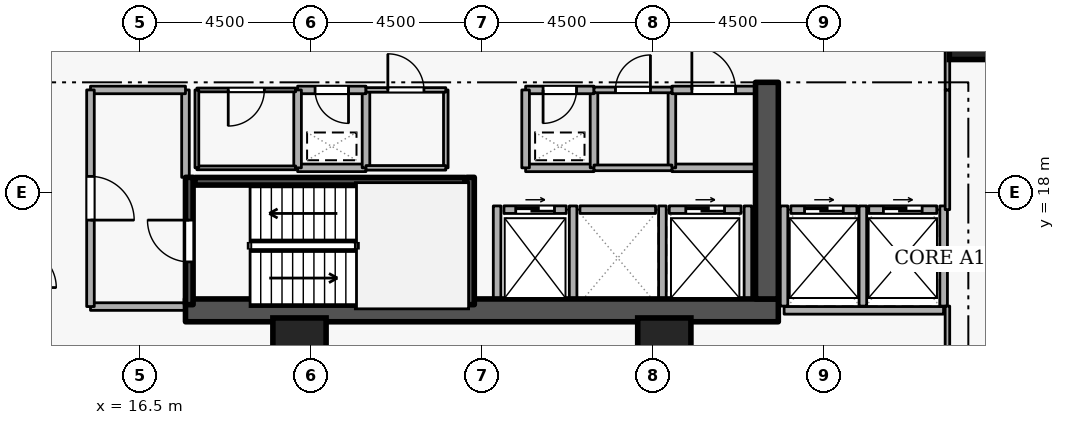
"""IFC4 building model, lengths in metres.
Left out: names, types, materials, properties, quantities, classifications, styles, units other than length and angle.
Written with IfcOpenShell. Run it as: python <this file> out.ifc"""

import sys

from ifc_helpers import new_model, si_unit, direction, frame, frame_2d, origin, origin_2d, place, context, subcontext, project, spatial, rectangle, extrude, element, fill, save


model = new_model("IFC4")
c1 = context("Model", 3, precision=1e-05, world=origin(), true_north=direction((0.0, 1.0)))
c2 = subcontext(c1, "Body", "Model", "MODEL_VIEW")
j1 = project(units=[si_unit("LENGTHUNIT", "METRE"), si_unit("PLANEANGLEUNIT", "RADIAN")], contexts=[c1])
p1 = place(None, origin())
s1 = spatial("IfcSite", under=j1, at=p1, CompositionType="ELEMENT")
p2 = place(p1, origin())
s2 = spatial("IfcBuilding", under=s1, at=p2, CompositionType="ELEMENT")
p3 = place(p2, frame((0.0, 0.0, 57.3)))
s3 = spatial("IfcBuildingStorey", under=s2, at=p3, CompositionType="ELEMENT", Elevation=57.3)
p4 = place(p3, frame((17.7, 14.9, 0.0), z_axis=(0.0, 0.0, 1.0), x_axis=(1.0, 0.0, 0.0)))
e1 = element("IfcWall", 1, at=p4, inside=s3, PredefinedType="SHEAR", context=c2, shape_type="SweptSolid", body=[
    extrude(rectangle(XDim=15.6, YDim=0.6, at=frame_2d((7.8, 0.0))), origin(), (0.0, 0.0, 1.0), 3.6),
])
p5 = place(p3, frame((33.0, 15.2, 0.0), z_axis=(0.0, 0.0, 1.0), x_axis=(0.0, 1.0, 0.0)))
e2 = element("IfcWall", 2, at=p5, inside=s3, PredefinedType="SHEAR", context=c2, shape_type="SweptSolid", body=[
    extrude(rectangle(XDim=5.7, YDim=0.6, at=frame_2d((2.85, 0.0))), origin(), (0.0, 0.0, 1.0), 3.6),
])
for number, where, z_axis, x_axis in (
    (3, (38.5, 22.2, 0.0), (0.0, 0.0, 1.0), (1.0, 0.0, 0.0)),
    (4, (20.7, 14.0, 0.0), (0.0, 0.0, 1.0), (1.0, 0.0, 0.0)),
    (5, (30.3, 14.0, 0.0), (0.0, 0.0, 1.0), (1.0, 0.0, 0.0)),
):
    element("IfcColumn", number, at=place(p3, frame(where, z_axis=z_axis, x_axis=x_axis)), inside=s3, PredefinedType="COLUMN", context=c2, shape_type="SweptSolid", body=[
        extrude(rectangle(XDim=1.4, YDim=1.4, at=origin_2d()), origin(), (0.0, 0.0, 1.0), 3.6),
    ])
p6 = place(p3, frame((26.08, 17.55, 0.0), z_axis=(0.0, 0.0, 1.0), x_axis=(1.0, 0.0, 0.0)))
e6 = element("IfcWall", 6, at=p6, inside=s3, PredefinedType="STANDARD", context=c2, shape_type="SweptSolid", body=[
    extrude(rectangle(XDim=1.64, YDim=0.2, at=frame_2d((0.82, 0.0))), origin(), (0.0, 0.0, 1.0), 3.34),
])
p7 = place(p6, frame((0.31, 0.0, 0.0)))
e7 = element("IfcOpeningElement", 7, at=p7, cuts=e6, PredefinedType="OPENING", context=c2, shape_type="SweptSolid", body=[
    extrude(rectangle(XDim=1.02, YDim=2.06, at=frame_2d((0.51, 1.03))), frame((0.0, 0.11, 0.0), z_axis=(0.0, -1.0, 0.0), x_axis=(1.0, 0.0, 0.0)), (0.0, 0.0, 1.0), 0.22),
])
p8 = place(p3, frame((28.08, 17.55, 0.0), z_axis=(0.0, 0.0, 1.0), x_axis=(1.0, 0.0, 0.0)))
e8 = element("IfcWall", 8, at=p8, inside=s3, PredefinedType="STANDARD", context=c2, shape_type="SweptSolid", body=[
    extrude(rectangle(XDim=1.99, YDim=0.2, at=frame_2d((0.995, 0.0))), origin(), (0.0, 0.0, 1.0), 3.34),
])
p9 = place(p3, frame((30.43, 17.55, 0.0), z_axis=(0.0, 0.0, 1.0), x_axis=(1.0, 0.0, 0.0)))
e9 = element("IfcWall", 9, at=p9, inside=s3, PredefinedType="STANDARD", context=c2, shape_type="SweptSolid", body=[
    extrude(rectangle(XDim=1.89, YDim=0.2, at=frame_2d((0.945, 0.0))), origin(), (0.0, 0.0, 1.0), 3.34),
])
p10 = place(p9, frame((0.435, 0.0, 0.0)))
e10 = element("IfcOpeningElement", 10, at=p10, cuts=e9, PredefinedType="OPENING", context=c2, shape_type="SweptSolid", body=[
    extrude(rectangle(XDim=1.02, YDim=2.06, at=frame_2d((0.51, 1.03))), frame((0.0, 0.11, 0.0), z_axis=(0.0, -1.0, 0.0), x_axis=(1.0, 0.0, 0.0)), (0.0, 0.0, 1.0), 0.22),
])
p11 = place(p3, frame((33.63, 17.55, 0.0), z_axis=(0.0, 0.0, 1.0), x_axis=(1.0, 0.0, 0.0)))
e11 = element("IfcWall", 11, at=p11, inside=s3, PredefinedType="STANDARD", context=c2, shape_type="SweptSolid", body=[
    extrude(rectangle(XDim=1.74, YDim=0.2, at=frame_2d((0.87, 0.0))), origin(), (0.0, 0.0, 1.0), 3.34),
])
p12 = place(p11, frame((0.36, 0.0, 0.0)))
e12 = element("IfcOpeningElement", 12, at=p12, cuts=e11, PredefinedType="OPENING", context=c2, shape_type="SweptSolid", body=[
    extrude(rectangle(XDim=1.02, YDim=2.06, at=frame_2d((0.51, 1.03))), frame((0.0, 0.11, 0.0), z_axis=(0.0, -1.0, 0.0), x_axis=(1.0, 0.0, 0.0)), (0.0, 0.0, 1.0), 0.22),
])
p13 = place(p3, frame((35.68, 17.55, 0.0), z_axis=(0.0, 0.0, 1.0), x_axis=(1.0, 0.0, 0.0)))
e13 = element("IfcWall", 13, at=p13, inside=s3, PredefinedType="STANDARD", context=c2, shape_type="SweptSolid", body=[
    extrude(rectangle(XDim=1.79, YDim=0.2, at=frame_2d((0.895, 0.0))), origin(), (0.0, 0.0, 1.0), 3.34),
])
p14 = place(p13, frame((0.385, 0.0, 0.0)))
e14 = element("IfcOpeningElement", 14, at=p14, cuts=e13, PredefinedType="OPENING", context=c2, shape_type="SweptSolid", body=[
    extrude(rectangle(XDim=1.02, YDim=2.06, at=frame_2d((0.51, 1.03))), frame((0.0, 0.11, 0.0), z_axis=(0.0, -1.0, 0.0), x_axis=(1.0, 0.0, 0.0)), (0.0, 0.0, 1.0), 0.22),
])
for number, where, z_axis, x_axis in (
    (15, (27.9, 15.212, 0.0), (0.0, 0.0, 1.0), (0.0, 1.0, 0.0)),
    (16, (25.9, 15.212, 0.0), (0.0, 0.0, 1.0), (0.0, 1.0, 0.0)),
    (17, (30.25, 15.212, 0.0), (0.0, 0.0, 1.0), (0.0, 1.0, 0.0)),
    (18, (32.5, 15.212, 0.0), (0.0, 0.0, 1.0), (0.0, 1.0, 0.0)),
):
    element("IfcWall", number, at=place(p3, frame(where, z_axis=z_axis, x_axis=x_axis)), inside=s3, PredefinedType="STANDARD", context=c2, shape_type="SweptSolid", body=[
        extrude(rectangle(XDim=2.436, YDim=0.2, at=frame_2d((1.218, 0.0))), origin(), (0.0, 0.0, 1.0), 3.34),
    ])
p15 = place(p3, frame((33.452, 14.9, 0.0), z_axis=(0.0, 0.0, 1.0), x_axis=(1.0, 0.0, 0.0)))
e19 = element("IfcWall", 19, at=p15, inside=s3, PredefinedType="STANDARD", context=c2, shape_type="SweptSolid", body=[
    extrude(rectangle(XDim=4.196, YDim=0.2, at=frame_2d((2.098, 0.0))), origin(), (0.0, 0.0, 1.0), 3.34),
])
for number, where, z_axis, x_axis in (
    (20, (35.525, 15.012, 0.0), (0.0, 0.0, 1.0), (0.0, 1.0, 0.0)),
    (21, (33.45, 15.012, 0.0), (0.0, 0.0, 1.0), (0.0, 1.0, 0.0)),
    (22, (37.65, 15.012, 0.0), (0.0, 0.0, 1.0), (0.0, 1.0, 0.0)),
):
    element("IfcWall", number, at=place(p3, frame(where, z_axis=z_axis, x_axis=x_axis)), inside=s3, PredefinedType="STANDARD", context=c2, shape_type="SweptSolid", body=[
        extrude(rectangle(XDim=2.636, YDim=0.2, at=frame_2d((1.318, 0.0))), origin(), (0.0, 0.0, 1.0), 3.34),
    ])
p16 = place(p3, frame((17.8, 15.05, 0.0), z_axis=(0.0, 0.0, 1.0), x_axis=(0.0, 1.0, 0.0)))
e23 = element("IfcWall", 23, at=p16, inside=s3, PredefinedType="SHEAR", context=c2, shape_type="SweptSolid", body=[
    extrude(rectangle(XDim=3.35, YDim=0.2, at=frame_2d((1.675, 0.0))), origin(), (0.0, 0.0, 1.0), 3.6),
])
p17 = place(p16, frame((1.125, 0.0, 0.0)))
e24 = element("IfcOpeningElement", 24, at=p17, cuts=e23, PredefinedType="OPENING", context=c2, shape_type="SweptSolid", body=[
    extrude(rectangle(XDim=1.1, YDim=2.1, at=frame_2d((0.55, 1.05))), frame((0.0, 0.11, 0.0), z_axis=(0.0, -1.0, 0.0), x_axis=(1.0, 0.0, 0.0)), (0.0, 0.0, 1.0), 0.22),
])
p18 = place(p3, frame((25.2, 18.4, 0.0), z_axis=(0.0, 0.0, 1.0), x_axis=(0.0, -1.0, 0.0)))
e25 = element("IfcWall", 25, at=p18, inside=s3, PredefinedType="SHEAR", context=c2, shape_type="SweptSolid", body=[
    extrude(rectangle(XDim=3.35, YDim=0.2, at=frame_2d((1.675, 0.0))), origin(), (0.0, 0.0, 1.0), 3.6),
])
p19 = place(p3, frame((25.05, 18.297, 0.0), z_axis=(0.0, 0.0, 1.0), x_axis=(-1.0, 0.0, 0.0)))
e26 = element("IfcWall", 26, at=p19, inside=s3, PredefinedType="SHEAR", context=c2, shape_type="SweptSolid", body=[
    extrude(rectangle(XDim=7.1, YDim=0.2, at=frame_2d((3.55, 0.0))), origin(), (0.0, 0.0, 1.0), 3.6),
])
p20 = place(p3, frame((15.2, 15.0, 0.0), z_axis=(0.0, 0.0, 1.0), x_axis=(1.0, 0.0, 0.0)))
e27 = element("IfcWall", 27, at=p20, inside=s3, PredefinedType="STANDARD", context=c2, shape_type="SweptSolid", body=[
    extrude(rectangle(XDim=2.5, YDim=0.2, at=frame_2d((1.25, 0.0))), origin(), (0.0, 0.0, 1.0), 3.34),
])
p21 = place(p3, frame((17.7, 18.4, 0.0), z_axis=(0.0, 0.0, 1.0), x_axis=(0.0, 1.0, 0.0)))
e28 = element("IfcWall", 28, at=p21, inside=s3, PredefinedType="STANDARD", context=c2, shape_type="SweptSolid", body=[
    extrude(rectangle(XDim=2.3, YDim=0.2, at=frame_2d((1.15, 0.0))), origin(), (0.0, 0.0, 1.0), 2.545),
])
p22 = place(p3, frame((17.7, 20.7, 0.0), z_axis=(0.0, 0.0, 1.0), x_axis=(-1.0, 0.0, 0.0)))
e29 = element("IfcWall", 29, at=p22, inside=s3, PredefinedType="STANDARD", context=c2, shape_type="SweptSolid", body=[
    extrude(rectangle(XDim=2.5, YDim=0.2, at=frame_2d((1.25, 0.0))), origin(), (0.0, 0.0, 1.0), 3.34),
])
p23 = place(p3, frame((15.2, 20.7, 0.0), z_axis=(0.0, 0.0, 1.0), x_axis=(0.0, -1.0, 0.0)))
e30 = element("IfcWall", 30, at=p23, inside=s3, PredefinedType="STANDARD", context=c2, shape_type="SweptSolid", body=[
    extrude(rectangle(XDim=5.7, YDim=0.2, at=frame_2d((2.85, 0.0))), origin(), (0.0, 0.0, 1.0), 3.34),
])
p24 = place(p23, frame((2.275, 0.0, 0.0)))
e31 = element("IfcOpeningElement", 31, at=p24, cuts=e30, PredefinedType="OPENING", context=c2, shape_type="SweptSolid", body=[
    extrude(rectangle(XDim=1.15, YDim=2.1, at=frame_2d((0.575, 1.05))), frame((0.0, 0.11, 0.0), z_axis=(0.0, -1.0, 0.0), x_axis=(1.0, 0.0, 0.0)), (0.0, 0.0, 1.0), 0.22),
])
p25 = place(p3, frame((26.65, 18.65, 0.0), z_axis=(0.0, 0.0, 1.0), x_axis=(1.0, 0.0, 0.0)))
e32 = element("IfcWall", 32, at=p25, inside=s3, PredefinedType="STANDARD", context=c2, shape_type="SweptSolid", body=[
    extrude(rectangle(XDim=1.8, YDim=0.2, at=frame_2d((0.9, 0.0))), origin(), (0.0, 0.0, 1.0), 3.34),
])
p26 = place(p3, frame((28.45, 18.65, 0.0), z_axis=(0.0, 0.0, 1.0), x_axis=(0.0, 1.0, 0.0)))
e33 = element("IfcWall", 33, at=p26, inside=s3, PredefinedType="STANDARD", context=c2, shape_type="SweptSolid", body=[
    extrude(rectangle(XDim=2.05, YDim=0.2, at=frame_2d((1.025, 0.0))), origin(), (0.0, 0.0, 1.0), 3.34),
])
p27 = place(p3, frame((28.45, 20.7, 0.0), z_axis=(0.0, 0.0, 1.0), x_axis=(-1.0, 0.0, 0.0)))
e34 = element("IfcWall", 34, at=p27, inside=s3, PredefinedType="STANDARD", context=c2, shape_type="SweptSolid", body=[
    extrude(rectangle(XDim=1.8, YDim=0.2, at=frame_2d((0.9, 0.0))), origin(), (0.0, 0.0, 1.0), 3.34),
])
p28 = place(p27, frame((0.46, 0.0, 0.0)))
e35 = element("IfcOpeningElement", 35, at=p28, cuts=e34, PredefinedType="OPENING", context=c2, shape_type="SweptSolid", body=[
    extrude(rectangle(XDim=0.88, YDim=2.04, at=frame_2d((0.44, 1.02))), frame((0.0, 0.11, 0.0), z_axis=(0.0, -1.0, 0.0), x_axis=(1.0, 0.0, 0.0)), (0.0, 0.0, 1.0), 0.22),
])
p29 = place(p3, frame((26.65, 20.7, 0.0), z_axis=(0.0, 0.0, 1.0), x_axis=(0.0, -1.0, 0.0)))
e36 = element("IfcWall", 36, at=p29, inside=s3, PredefinedType="STANDARD", context=c2, shape_type="SweptSolid", body=[
    extrude(rectangle(XDim=2.05, YDim=0.2, at=frame_2d((1.025, 0.0))), origin(), (0.0, 0.0, 1.0), 3.34),
])
p30 = place(p3, frame((20.65, 18.65, 0.0), z_axis=(0.0, 0.0, 1.0), x_axis=(1.0, 0.0, 0.0)))
e37 = element("IfcWall", 37, at=p30, inside=s3, PredefinedType="STANDARD", context=c2, shape_type="SweptSolid", body=[
    extrude(rectangle(XDim=1.8, YDim=0.2, at=frame_2d((0.9, 0.0))), origin(), (0.0, 0.0, 1.0), 3.34),
])
p31 = place(p3, frame((22.45, 18.65, 0.0), z_axis=(0.0, 0.0, 1.0), x_axis=(0.0, 1.0, 0.0)))
e38 = element("IfcWall", 38, at=p31, inside=s3, PredefinedType="STANDARD", context=c2, shape_type="SweptSolid", body=[
    extrude(rectangle(XDim=2.05, YDim=0.2, at=frame_2d((1.025, 0.0))), origin(), (0.0, 0.0, 1.0), 3.34),
])
p32 = place(p3, frame((22.45, 20.7, 0.0), z_axis=(0.0, 0.0, 1.0), x_axis=(-1.0, 0.0, 0.0)))
e39 = element("IfcWall", 39, at=p32, inside=s3, PredefinedType="STANDARD", context=c2, shape_type="SweptSolid", body=[
    extrude(rectangle(XDim=1.8, YDim=0.2, at=frame_2d((0.9, 0.0))), origin(), (0.0, 0.0, 1.0), 3.34),
])
p33 = place(p32, frame((0.46, 0.0, 0.0)))
e40 = element("IfcOpeningElement", 40, at=p33, cuts=e39, PredefinedType="OPENING", context=c2, shape_type="SweptSolid", body=[
    extrude(rectangle(XDim=0.88, YDim=2.04, at=frame_2d((0.44, 1.02))), frame((0.0, 0.11, 0.0), z_axis=(0.0, -1.0, 0.0), x_axis=(1.0, 0.0, 0.0)), (0.0, 0.0, 1.0), 0.22),
])
p34 = place(p3, frame((20.65, 20.7, 0.0), z_axis=(0.0, 0.0, 1.0), x_axis=(0.0, -1.0, 0.0)))
e41 = element("IfcWall", 41, at=p34, inside=s3, PredefinedType="STANDARD", context=c2, shape_type="SweptSolid", body=[
    extrude(rectangle(XDim=2.05, YDim=0.2, at=frame_2d((1.025, 0.0))), origin(), (0.0, 0.0, 1.0), 3.34),
])
p35 = place(p3, frame((32.7, 18.65, 0.0), z_axis=(0.0, 0.0, 1.0), x_axis=(-1.0, 0.0, 0.0)))
e42 = element("IfcWall", 42, at=p35, inside=s3, PredefinedType="STANDARD", context=c2, shape_type="SweptSolid", body=[
    extrude(rectangle(XDim=2.2, YDim=0.2, at=frame_2d((1.1, 0.0))), origin(), (0.0, 0.0, 1.0), 3.34),
])
p36 = place(p3, frame((30.5, 18.65, 0.0), z_axis=(0.0, 0.0, 1.0), x_axis=(0.0, 1.0, 0.0)))
e43 = element("IfcWall", 43, at=p36, inside=s3, PredefinedType="STANDARD", context=c2, shape_type="SweptSolid", body=[
    extrude(rectangle(XDim=2.05, YDim=0.2, at=frame_2d((1.025, 0.0))), origin(), (0.0, 0.0, 1.0), 3.34),
])
p37 = place(p3, frame((30.5, 20.7, 0.0), z_axis=(0.0, 0.0, 1.0), x_axis=(1.0, 0.0, 0.0)))
e44 = element("IfcWall", 44, at=p37, inside=s3, PredefinedType="STANDARD", context=c2, shape_type="SweptSolid", body=[
    extrude(rectangle(XDim=2.2, YDim=0.2, at=frame_2d((1.1, 0.0))), origin(), (0.0, 0.0, 1.0), 3.34),
])
p38 = place(p37, frame((0.525, 0.0, 0.0)))
e45 = element("IfcOpeningElement", 45, at=p38, cuts=e44, PredefinedType="OPENING", context=c2, shape_type="SweptSolid", body=[
    extrude(rectangle(XDim=1.15, YDim=2.1, at=frame_2d((0.575, 1.05))), frame((0.0, 0.11, 0.0), z_axis=(0.0, -1.0, 0.0), x_axis=(1.0, 0.0, 0.0)), (0.0, 0.0, 1.0), 0.22),
])
p39 = place(p3, frame((18.0, 18.65, 0.0), z_axis=(0.0, 0.0, 1.0), x_axis=(1.0, 0.0, 0.0)))
e46 = element("IfcWall", 46, at=p39, inside=s3, PredefinedType="PARTITIONING", context=c2, shape_type="SweptSolid", body=[
    extrude(rectangle(XDim=2.6, YDim=0.1, at=frame_2d((1.3, 0.0))), origin(), (0.0, 0.0, 1.0), 3.34),
])
p40 = place(p3, frame((20.6, 20.7, 0.0), z_axis=(0.0, 0.0, 1.0), x_axis=(-1.0, 0.0, 0.0)))
e47 = element("IfcWall", 47, at=p40, inside=s3, PredefinedType="PARTITIONING", context=c2, shape_type="SweptSolid", body=[
    extrude(rectangle(XDim=2.6, YDim=0.1, at=frame_2d((1.3, 0.0))), origin(), (0.0, 0.0, 1.0), 3.34),
])
p41 = place(p40, frame((0.825, 0.0, 0.0)))
e48 = element("IfcOpeningElement", 48, at=p41, cuts=e47, PredefinedType="OPENING", context=c2, shape_type="SweptSolid", body=[
    extrude(rectangle(XDim=0.95, YDim=2.1, at=frame_2d((0.475, 1.05))), frame((0.0, 0.06, 0.0), z_axis=(0.0, -1.0, 0.0), x_axis=(1.0, 0.0, 0.0)), (0.0, 0.0, 1.0), 0.12),
])
p42 = place(p3, frame((18.0, 20.7, 0.0), z_axis=(0.0, 0.0, 1.0), x_axis=(0.0, -1.0, 0.0)))
e49 = element("IfcWall", 49, at=p42, inside=s3, PredefinedType="PARTITIONING", context=c2, shape_type="SweptSolid", body=[
    extrude(rectangle(XDim=2.05, YDim=0.1, at=frame_2d((1.025, 0.0))), origin(), (0.0, 0.0, 1.0), 2.545),
])
p43 = place(p3, frame((24.55, 20.7, 0.0), z_axis=(0.0, 0.0, 1.0), x_axis=(0.0, -1.0, 0.0)))
e50 = element("IfcWall", 50, at=p43, inside=s3, PredefinedType="PARTITIONING", context=c2, shape_type="SweptSolid", body=[
    extrude(rectangle(XDim=2.05, YDim=0.12, at=frame_2d((1.025, 0.0))), origin(), (0.0, 0.0, 1.0), 3.34),
])
p44 = place(p3, frame((24.55, 18.65, 0.0), z_axis=(0.0, 0.0, 1.0), x_axis=(-1.0, 0.0, 0.0)))
e51 = element("IfcWall", 51, at=p44, inside=s3, PredefinedType="PARTITIONING", context=c2, shape_type="SweptSolid", body=[
    extrude(rectangle(XDim=2.1, YDim=0.12, at=frame_2d((1.05, 0.0))), origin(), (0.0, 0.0, 1.0), 3.34),
])
p45 = place(p3, frame((22.45, 20.7, 0.0), z_axis=(0.0, 0.0, 1.0), x_axis=(1.0, 0.0, 0.0)))
e52 = element("IfcWall", 52, at=p45, inside=s3, PredefinedType="PARTITIONING", context=c2, shape_type="SweptSolid", body=[
    extrude(rectangle(XDim=2.1, YDim=0.12, at=frame_2d((1.05, 0.0))), origin(), (0.0, 0.0, 1.0), 3.34),
])
p46 = place(p45, frame((0.575, 0.0, 0.0)))
e53 = element("IfcOpeningElement", 53, at=p46, cuts=e52, PredefinedType="OPENING", context=c2, shape_type="SweptSolid", body=[
    extrude(rectangle(XDim=0.95, YDim=2.1, at=frame_2d((0.475, 1.05))), frame((0.0, 0.07, 0.0), z_axis=(0.0, -1.0, 0.0), x_axis=(1.0, 0.0, 0.0)), (0.0, 0.0, 1.0), 0.14),
])
p47 = place(p3, frame((30.5, 18.65, 0.0), z_axis=(0.0, 0.0, 1.0), x_axis=(-1.0, 0.0, 0.0)))
e54 = element("IfcWall", 54, at=p47, inside=s3, PredefinedType="PARTITIONING", context=c2, shape_type="SweptSolid", body=[
    extrude(rectangle(XDim=2.05, YDim=0.15, at=frame_2d((1.025, 0.0))), origin(), (0.0, 0.0, 1.0), 3.34),
])
p48 = place(p3, frame((28.45, 20.7, 0.0), z_axis=(0.0, 0.0, 1.0), x_axis=(1.0, 0.0, 0.0)))
e55 = element("IfcWall", 55, at=p48, inside=s3, PredefinedType="PARTITIONING", context=c2, shape_type="SweptSolid", body=[
    extrude(rectangle(XDim=2.05, YDim=0.15, at=frame_2d((1.025, 0.0))), origin(), (0.0, 0.0, 1.0), 3.34),
])
p49 = place(p48, frame((0.565, 0.0, 0.0)))
e56 = element("IfcOpeningElement", 56, at=p49, cuts=e55, PredefinedType="OPENING", context=c2, shape_type="SweptSolid", body=[
    extrude(rectangle(XDim=0.92, YDim=2.08, at=frame_2d((0.46, 1.04))), frame((0.0, 0.085, 0.0), z_axis=(0.0, -1.0, 0.0), x_axis=(1.0, 0.0, 0.0)), (0.0, 0.0, 1.0), 0.17),
])
p50 = place(p3, frame((37.75, 17.55, 0.0), z_axis=(0.0, 0.0, 1.0), x_axis=(0.0, 1.0, 0.0)))
e57 = element("IfcWall", 57, at=p50, inside=s3, PredefinedType="PARTITIONING", context=c2, shape_type="SweptSolid", body=[
    extrude(rectangle(XDim=3.15, YDim=0.12, at=frame_2d((1.575, 0.0))), origin(), (0.0, 0.0, 1.0), 3.34),
])
p51 = place(p3, frame((37.75, 20.7, 0.0), z_axis=(0.0, 0.0, 1.0), x_axis=(0.0, 1.0, 0.0)))
e58 = element("IfcWall", 58, at=p51, inside=s3, PredefinedType="PARTITIONING", context=c2, shape_type="SweptSolid", body=[
    extrude(rectangle(XDim=1.85, YDim=0.12, at=frame_2d((0.925, 0.0))), origin(), (0.0, 0.0, 1.0), 3.34),
])
p52 = place(p3, frame((37.75, 13.15, 0.0), z_axis=(0.0, 0.0, 1.0), x_axis=(0.0, 1.0, 0.0)))
e59 = element("IfcWall", 59, at=p52, inside=s3, PredefinedType="PARTITIONING", context=c2, shape_type="SweptSolid", body=[
    extrude(rectangle(XDim=1.862, YDim=0.12, at=frame_2d((0.931, 0.0))), origin(), (0.0, 0.0, 1.0), 3.34),
])
p53 = place(p7, origin())
e60 = element("IfcDoor", 60, at=p53, inside=s3, OperationType="SLIDING_TO_LEFT", PredefinedType="DOOR", context=c2, shape_type="SweptSolid", body=[
    extrude(rectangle(XDim=1.02, YDim=2.06, at=frame_2d((0.51, 1.03))), frame((0.0, 0.025, 0.0), z_axis=(0.0, -1.0, 0.0), x_axis=(1.0, 0.0, 0.0)), (0.0, 0.0, 1.0), 0.05),
])
fill(e7, e60)
p54 = place(p10, origin())
e61 = element("IfcDoor", 61, at=p54, inside=s3, OperationType="SLIDING_TO_LEFT", PredefinedType="DOOR", context=c2, shape_type="SweptSolid", body=[
    extrude(rectangle(XDim=1.02, YDim=2.06, at=frame_2d((0.51, 1.03))), frame((0.0, 0.025, 0.0), z_axis=(0.0, -1.0, 0.0), x_axis=(1.0, 0.0, 0.0)), (0.0, 0.0, 1.0), 0.05),
])
fill(e10, e61)
p55 = place(p12, origin())
e62 = element("IfcDoor", 62, at=p55, inside=s3, OperationType="SLIDING_TO_LEFT", PredefinedType="DOOR", context=c2, shape_type="SweptSolid", body=[
    extrude(rectangle(XDim=1.02, YDim=2.06, at=frame_2d((0.51, 1.03))), frame((0.0, 0.025, 0.0), z_axis=(0.0, -1.0, 0.0), x_axis=(1.0, 0.0, 0.0)), (0.0, 0.0, 1.0), 0.05),
])
fill(e12, e62)
p56 = place(p14, origin())
e63 = element("IfcDoor", 63, at=p56, inside=s3, OperationType="SLIDING_TO_LEFT", PredefinedType="DOOR", context=c2, shape_type="SweptSolid", body=[
    extrude(rectangle(XDim=1.02, YDim=2.06, at=frame_2d((0.51, 1.03))), frame((0.0, 0.025, 0.0), z_axis=(0.0, -1.0, 0.0), x_axis=(1.0, 0.0, 0.0)), (0.0, 0.0, 1.0), 0.05),
])
fill(e14, e63)
p57 = place(p17, origin())
e64 = element("IfcDoor", 64, at=p57, inside=s3, OperationType="SINGLE_SWING_RIGHT", PredefinedType="DOOR", context=c2, shape_type="SweptSolid", body=[
    extrude(rectangle(XDim=1.1, YDim=2.1, at=frame_2d((0.55, 1.05))), frame((0.0, 0.025, 0.0), z_axis=(0.0, -1.0, 0.0), x_axis=(1.0, 0.0, 0.0)), (0.0, 0.0, 1.0), 0.05),
])
fill(e24, e64)
p58 = place(p24, origin())
e65 = element("IfcDoor", 65, at=p58, inside=s3, OperationType="SINGLE_SWING_RIGHT", PredefinedType="DOOR", context=c2, shape_type="SweptSolid", body=[
    extrude(rectangle(XDim=1.15, YDim=2.1, at=frame_2d((0.575, 1.05))), frame((0.0, 0.025, 0.0), z_axis=(0.0, -1.0, 0.0), x_axis=(1.0, 0.0, 0.0)), (0.0, 0.0, 1.0), 0.05),
])
fill(e31, e65)
p59 = place(p28, origin())
e66 = element("IfcDoor", 66, at=p59, inside=s3, OperationType="SINGLE_SWING_RIGHT", PredefinedType="DOOR", context=c2, shape_type="SweptSolid", body=[
    extrude(rectangle(XDim=0.88, YDim=2.04, at=frame_2d((0.44, 1.02))), frame((0.0, 0.025, 0.0), z_axis=(0.0, -1.0, 0.0), x_axis=(1.0, 0.0, 0.0)), (0.0, 0.0, 1.0), 0.05),
])
fill(e35, e66)
p60 = place(p33, origin())
e67 = element("IfcDoor", 67, at=p60, inside=s3, OperationType="SINGLE_SWING_LEFT", PredefinedType="DOOR", context=c2, shape_type="SweptSolid", body=[
    extrude(rectangle(XDim=0.88, YDim=2.04, at=frame_2d((0.44, 1.02))), frame((0.0, 0.025, 0.0), z_axis=(0.0, -1.0, 0.0), x_axis=(1.0, 0.0, 0.0)), (0.0, 0.0, 1.0), 0.05),
])
fill(e40, e67)
p61 = place(p41, origin())
e68 = element("IfcDoor", 68, at=p61, inside=s3, OperationType="SINGLE_SWING_RIGHT", PredefinedType="DOOR", context=c2, shape_type="SweptSolid", body=[
    extrude(rectangle(XDim=0.95, YDim=2.1, at=frame_2d((0.475, 1.05))), frame((0.0, 0.025, 0.0), z_axis=(0.0, -1.0, 0.0), x_axis=(1.0, 0.0, 0.0)), (0.0, 0.0, 1.0), 0.05),
])
fill(e48, e68)
p62 = place(p46, origin())
e69 = element("IfcDoor", 69, at=p62, inside=s3, OperationType="SINGLE_SWING_LEFT", PredefinedType="DOOR", context=c2, shape_type="SweptSolid", body=[
    extrude(rectangle(XDim=0.95, YDim=2.1, at=frame_2d((0.475, 1.05))), frame((0.0, 0.025, 0.0), z_axis=(0.0, -1.0, 0.0), x_axis=(1.0, 0.0, 0.0)), (0.0, 0.0, 1.0), 0.05),
])
fill(e53, e69)
p63 = place(p49, origin())
e70 = element("IfcDoor", 70, at=p63, inside=s3, OperationType="SINGLE_SWING_RIGHT", PredefinedType="DOOR", context=c2, shape_type="SweptSolid", body=[
    extrude(rectangle(XDim=0.92, YDim=2.08, at=frame_2d((0.46, 1.04))), frame((0.0, 0.025, 0.0), z_axis=(0.0, -1.0, 0.0), x_axis=(1.0, 0.0, 0.0)), (0.0, 0.0, 1.0), 0.05),
])
fill(e56, e70)
p64 = place(p38, origin())
e71 = element("IfcDoor", 71, at=p64, inside=s3, OperationType="SINGLE_SWING_LEFT", PredefinedType="DOOR", context=c2, shape_type="SweptSolid", body=[
    extrude(rectangle(XDim=1.15, YDim=2.1, at=frame_2d((0.575, 1.05))), frame((0.0, 0.025, 0.0), z_axis=(0.0, -1.0, 0.0), x_axis=(1.0, 0.0, 0.0)), (0.0, 0.0, 1.0), 0.05),
])
fill(e45, e71)
save(model, sys.argv[1])
